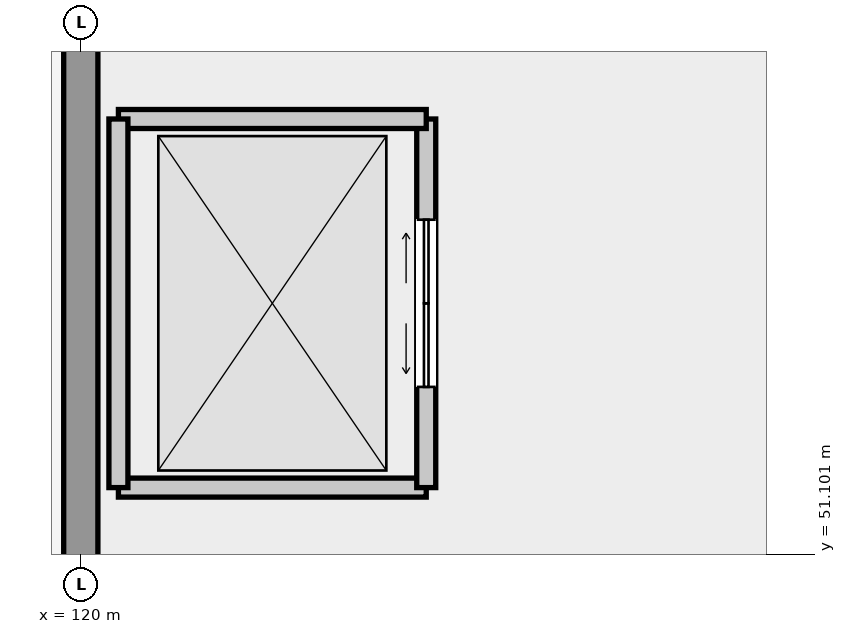
"""IFC4 building model, lengths in metres.
Left out: names, types, materials, properties, quantities, classifications, styles, units other than length and angle.
Written with IfcOpenShell. Run it as: python <this file> out.ifc"""

import sys

from ifc_helpers import new_model, si_unit, direction, frame, frame_2d, origin, place, context, subcontext, project, spatial, rectangle, extrude, element, fill, save


model = new_model("IFC4")
c1 = context("Model", 3, precision=1e-05, world=origin(), true_north=direction((0.0, 1.0)))
c2 = subcontext(c1, "Body", "Model", "MODEL_VIEW")
j1 = project(units=[si_unit("LENGTHUNIT", "METRE"), si_unit("PLANEANGLEUNIT", "RADIAN")], contexts=[c1])
p1 = place(None, origin())
s1 = spatial("IfcSite", under=j1, at=p1, CompositionType="ELEMENT")
p2 = place(p1, origin())
s2 = spatial("IfcBuilding", under=s1, at=p2, CompositionType="ELEMENT")
p3 = place(p2, frame((0.0, 0.0, -5.4)))
s3 = spatial("IfcBuildingStorey", under=s2, at=p3, CompositionType="ELEMENT", Elevation=-5.4)
p4 = place(p3, frame((120.0, 62.005, 0.0), z_axis=(0.0, 0.0, 1.0), x_axis=(0.0, -1.0, 0.0)))
e1 = element("IfcWall", 1, at=p4, inside=s3, PredefinedType="USERDEFINED", context=c2, shape_type="SweptSolid", body=[
    extrude(rectangle(XDim=11.21, YDim=0.45, at=frame_2d((5.605, 0.0))), origin(), (0.0, 0.0, 1.0), 4.54),
])
p5 = place(p3, frame((120.495, 51.975, 0.0), z_axis=(0.0, 0.0, 1.0), x_axis=(1.0, 0.0, 0.0)))
e2 = element("IfcWall", 2, at=p5, inside=s3, PredefinedType="SOLIDWALL", context=c2, shape_type="SweptSolid", body=[
    extrude(rectangle(XDim=4.05, YDim=0.25, at=frame_2d((2.025, 0.0))), origin(), (0.0, 0.0, 1.0), 5.12),
])
p6 = place(p3, frame((124.545, 51.975, 0.0), z_axis=(0.0, 0.0, 1.0), x_axis=(0.0, 1.0, 0.0)))
e3 = element("IfcWall", 3, at=p6, inside=s3, PredefinedType="SOLIDWALL", context=c2, shape_type="SweptSolid", body=[
    extrude(rectangle(XDim=4.85, YDim=0.25, at=frame_2d((2.425, 0.0))), origin(), (0.0, 0.0, 1.0), 5.12),
])
p7 = place(p6, frame((1.325, 0.0, 0.0)))
e4 = element("IfcOpeningElement", 4, at=p7, cuts=e3, PredefinedType="OPENING", context=c2, shape_type="SweptSolid", body=[
    extrude(rectangle(XDim=2.2, YDim=2.65, at=frame_2d((1.1, 1.325))), frame((0.0, 0.135, 0.0), z_axis=(0.0, -1.0, 0.0), x_axis=(1.0, 0.0, 0.0)), (0.0, 0.0, 1.0), 0.27),
])
p8 = place(p3, frame((124.545, 56.825, 0.0), z_axis=(0.0, 0.0, 1.0), x_axis=(-1.0, 0.0, 0.0)))
e5 = element("IfcWall", 5, at=p8, inside=s3, PredefinedType="SOLIDWALL", context=c2, shape_type="SweptSolid", body=[
    extrude(rectangle(XDim=4.05, YDim=0.25, at=frame_2d((2.025, 0.0))), origin(), (0.0, 0.0, 1.0), 5.12),
])
p9 = place(p3, frame((120.495, 56.825, 0.0), z_axis=(0.0, 0.0, 1.0), x_axis=(0.0, -1.0, 0.0)))
e6 = element("IfcWall", 6, at=p9, inside=s3, PredefinedType="SOLIDWALL", context=c2, shape_type="SweptSolid", body=[
    extrude(rectangle(XDim=4.85, YDim=0.25, at=frame_2d((2.425, 0.0))), origin(), (0.0, 0.0, 1.0), 5.12),
])
p10 = place(p7, origin())
e7 = element("IfcDoor", 7, at=p10, inside=s3, OperationType="DOUBLE_DOOR_SLIDING", PredefinedType="DOOR", context=c2, shape_type="SweptSolid", body=[
    extrude(rectangle(XDim=2.2, YDim=2.65, at=frame_2d((1.1, 1.325))), frame((0.0, 0.025, 0.0), z_axis=(0.0, -1.0, 0.0), x_axis=(1.0, 0.0, 0.0)), (0.0, 0.0, 1.0), 0.05),
])
fill(e4, e7)
save(model, sys.argv[1])
